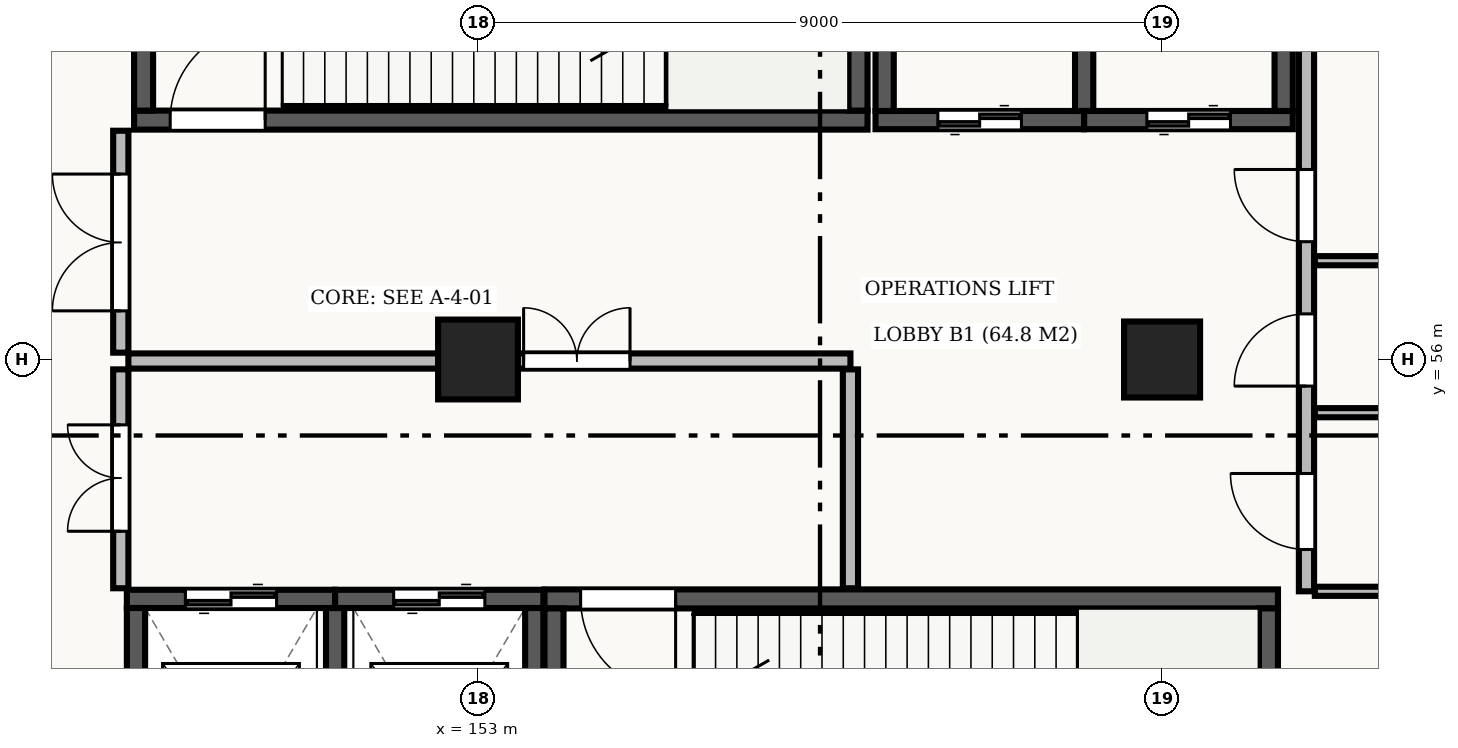
"""IFC4 building model, lengths in metres.
Left out: names, types, materials, properties, quantities, classifications, styles, units other than length and angle.
Written with IfcOpenShell. Run it as: python <this file> out.ifc"""

import sys

from ifc_helpers import new_model, si_unit, direction, frame, frame_2d, origin, origin_2d, place, context, subcontext, project, spatial, rectangle, extrude, element, fill, save


model = new_model("IFC4")
c1 = context("Model", 3, precision=1e-05, world=origin(), true_north=direction((0.0, 1.0)))
c2 = subcontext(c1, "Body", "Model", "MODEL_VIEW")
j1 = project(units=[si_unit("LENGTHUNIT", "METRE"), si_unit("PLANEANGLEUNIT", "RADIAN")], contexts=[c1])
p1 = place(None, origin())
s1 = spatial("IfcSite", under=j1, at=p1, CompositionType="ELEMENT")
p2 = place(p1, origin())
s2 = spatial("IfcBuilding", under=s1, at=p2, CompositionType="ELEMENT")
p3 = place(p2, frame((0.0, 0.0, -6.0)))
s3 = spatial("IfcBuildingStorey", under=s2, at=p3, CompositionType="ELEMENT", Elevation=-6.0)
p4 = place(p3, frame((153.0, 56.0, 0.0), z_axis=(0.0, 0.0, 1.0), x_axis=(1.0, 0.0, 0.0)))
e1 = element("IfcColumn", 1, at=p4, inside=s3, PredefinedType="COLUMN", context=c2, shape_type="SweptSolid", body=[
    extrude(rectangle(XDim=1.05, YDim=1.05, at=origin_2d()), origin(), (0.0, 0.0, 1.0), 6.0),
])
p5 = place(p3, frame((162.0, 56.0, 0.0), z_axis=(0.0, 0.0, 1.0), x_axis=(1.0, 0.0, 0.0)))
e2 = element("IfcColumn", 2, at=p5, inside=s3, PredefinedType="COLUMN", context=c2, shape_type="SweptSolid", body=[
    extrude(rectangle(XDim=1.0, YDim=1.0, at=origin_2d()), origin(), (0.0, 0.0, 1.0), 6.0),
])
p6 = place(p3, frame((148.475, 59.15, 0.0), z_axis=(0.0, 0.0, 1.0), x_axis=(1.0, 0.0, 0.0)))
e3 = element("IfcWall", 3, at=p6, inside=s3, PredefinedType="SHEAR", context=c2, shape_type="SweptSolid", body=[
    extrude(rectangle(XDim=9.65, YDim=0.25, at=frame_2d((4.825, 0.0))), origin(), (0.0, 0.0, 1.0), 5.55),
])
p7 = place(p6, frame((0.475, 0.0, 0.0)))
e4 = element("IfcOpeningElement", 4, at=p7, cuts=e3, PredefinedType="OPENING", context=c2, shape_type="SweptSolid", body=[
    extrude(rectangle(XDim=1.25, YDim=2.15, at=frame_2d((0.625, 1.075))), frame((0.0, 0.137, 0.0), z_axis=(0.0, -1.0, 0.0), x_axis=(1.0, 0.0, 0.0)), (0.0, 0.0, 1.0), 0.274),
])
for number, where, z_axis, x_axis in (
    (5, (148.6, 63.125, 0.0), (0.0, 0.0, 1.0), (0.0, -1.0, 0.0)),
    (6, (158.0, 59.275, 0.0), (0.0, 0.0, 1.0), (0.0, 1.0, 0.0)),
):
    element("IfcWall", number, at=place(p3, frame(where, z_axis=z_axis, x_axis=x_axis)), inside=s3, PredefinedType="SHEAR", context=c2, shape_type="SweptSolid", body=[
        extrude(rectangle(XDim=3.85, YDim=0.25, at=frame_2d((1.925, 0.0))), origin(), (0.0, 0.0, 1.0), 5.55),
    ])
p8 = place(p3, frame((163.525, 52.85, 0.0), z_axis=(0.0, 0.0, 1.0), x_axis=(-1.0, 0.0, 0.0)))
e7 = element("IfcWall", 7, at=p8, inside=s3, PredefinedType="SHEAR", context=c2, shape_type="SweptSolid", body=[
    extrude(rectangle(XDim=9.65, YDim=0.25, at=frame_2d((4.825, 0.0))), origin(), (0.0, 0.0, 1.0), 5.55),
])
p9 = place(p8, frame((7.925, 0.0, 0.0)))
e8 = element("IfcOpeningElement", 8, at=p9, cuts=e7, PredefinedType="OPENING", context=c2, shape_type="SweptSolid", body=[
    extrude(rectangle(XDim=1.25, YDim=2.15, at=frame_2d((0.625, 1.075))), frame((0.0, 0.137, 0.0), z_axis=(0.0, -1.0, 0.0), x_axis=(1.0, 0.0, 0.0)), (0.0, 0.0, 1.0), 0.274),
])
for number, where, z_axis, x_axis in (
    (9, (154.0, 52.725, 0.0), (0.0, 0.0, 1.0), (0.0, -1.0, 0.0)),
    (10, (163.4, 48.875, 0.0), (0.0, 0.0, 1.0), (0.0, 1.0, 0.0)),
):
    element("IfcWall", number, at=place(p3, frame(where, z_axis=z_axis, x_axis=x_axis)), inside=s3, PredefinedType="SHEAR", context=c2, shape_type="SweptSolid", body=[
        extrude(rectangle(XDim=3.85, YDim=0.25, at=frame_2d((1.925, 0.0))), origin(), (0.0, 0.0, 1.0), 5.55),
    ])
p10 = place(p3, frame((158.23, 59.15, 0.0), z_axis=(0.0, 0.0, 1.0), x_axis=(1.0, 0.0, 0.0)))
e11 = element("IfcWall", 11, at=p10, inside=s3, PredefinedType="SHEAR", context=c2, shape_type="SweptSolid", body=[
    extrude(rectangle(XDim=2.745, YDim=0.24, at=frame_2d((1.373, 0.0))), origin(), (0.0, 0.0, 1.0), 5.55),
])
p11 = place(p10, frame((0.82, 0.0, 0.0)))
e12 = element("IfcOpeningElement", 12, at=p11, cuts=e11, PredefinedType="OPENING", context=c2, shape_type="SweptSolid", body=[
    extrude(rectangle(XDim=1.1, YDim=2.2, at=frame_2d((0.55, 1.1))), frame((0.0, 0.132, 0.0), z_axis=(0.0, -1.0, 0.0), x_axis=(1.0, 0.0, 0.0)), (0.0, 0.0, 1.0), 0.264),
])
for number, where, z_axis, x_axis in (
    (13, (158.35, 63.13, 0.0), (0.0, 0.0, 1.0), (0.0, -1.0, 0.0)),
    (14, (160.975, 59.27, 0.0), (0.0, 0.0, 1.0), (0.0, 1.0, 0.0)),
):
    element("IfcWall", number, at=place(p3, frame(where, z_axis=z_axis, x_axis=x_axis)), inside=s3, PredefinedType="SHEAR", context=c2, shape_type="SweptSolid", body=[
        extrude(rectangle(XDim=3.86, YDim=0.24, at=frame_2d((1.93, 0.0))), origin(), (0.0, 0.0, 1.0), 5.55),
    ])
p12 = place(p3, frame((160.975, 59.15, 0.0), z_axis=(0.0, 0.0, 1.0), x_axis=(1.0, 0.0, 0.0)))
e15 = element("IfcWall", 15, at=p12, inside=s3, PredefinedType="SHEAR", context=c2, shape_type="SweptSolid", body=[
    extrude(rectangle(XDim=2.745, YDim=0.24, at=frame_2d((1.373, 0.0))), origin(), (0.0, 0.0, 1.0), 5.55),
])
p13 = place(p12, frame((0.825, 0.0, 0.0)))
e16 = element("IfcOpeningElement", 16, at=p13, cuts=e15, PredefinedType="OPENING", context=c2, shape_type="SweptSolid", body=[
    extrude(rectangle(XDim=1.1, YDim=2.2, at=frame_2d((0.55, 1.1))), frame((0.0, 0.132, 0.0), z_axis=(0.0, -1.0, 0.0), x_axis=(1.0, 0.0, 0.0)), (0.0, 0.0, 1.0), 0.264),
])
p14 = place(p3, frame((163.6, 59.27, 0.0), z_axis=(0.0, 0.0, 1.0), x_axis=(0.0, 1.0, 0.0)))
e17 = element("IfcWall", 17, at=p14, inside=s3, PredefinedType="SHEAR", context=c2, shape_type="SweptSolid", body=[
    extrude(rectangle(XDim=3.86, YDim=0.24, at=frame_2d((1.93, 0.0))), origin(), (0.0, 0.0, 1.0), 5.55),
])
p15 = place(p3, frame((151.12, 52.85, 0.0), z_axis=(0.0, 0.0, 1.0), x_axis=(-1.0, 0.0, 0.0)))
e18 = element("IfcWall", 18, at=p15, inside=s3, PredefinedType="SHEAR", context=c2, shape_type="SweptSolid", body=[
    extrude(rectangle(XDim=2.74, YDim=0.24, at=frame_2d((1.37, 0.0))), origin(), (0.0, 0.0, 1.0), 5.55),
])
p16 = place(p15, frame((0.77, 0.0, 0.0)))
e19 = element("IfcOpeningElement", 19, at=p16, cuts=e18, PredefinedType="OPENING", context=c2, shape_type="SweptSolid", body=[
    extrude(rectangle(XDim=1.2, YDim=2.2, at=frame_2d((0.6, 1.1))), frame((0.0, 0.132, 0.0), z_axis=(0.0, -1.0, 0.0), x_axis=(1.0, 0.0, 0.0)), (0.0, 0.0, 1.0), 0.264),
])
for number, where, z_axis, x_axis in (
    (20, (148.5, 52.73, 0.0), (0.0, 0.0, 1.0), (0.0, -1.0, 0.0)),
    (21, (151.12, 48.87, 0.0), (0.0, 0.0, 1.0), (0.0, 1.0, 0.0)),
):
    element("IfcWall", number, at=place(p3, frame(where, z_axis=z_axis, x_axis=x_axis)), inside=s3, PredefinedType="SHEAR", context=c2, shape_type="SweptSolid", body=[
        extrude(rectangle(XDim=3.86, YDim=0.24, at=frame_2d((1.93, 0.0))), origin(), (0.0, 0.0, 1.0), 5.55),
    ])
p17 = place(p3, frame((153.86, 52.85, 0.0), z_axis=(0.0, 0.0, 1.0), x_axis=(-1.0, 0.0, 0.0)))
e22 = element("IfcWall", 22, at=p17, inside=s3, PredefinedType="SHEAR", context=c2, shape_type="SweptSolid", body=[
    extrude(rectangle(XDim=2.74, YDim=0.24, at=frame_2d((1.37, 0.0))), origin(), (0.0, 0.0, 1.0), 5.55),
])
p18 = place(p17, frame((0.77, 0.0, 0.0)))
e23 = element("IfcOpeningElement", 23, at=p18, cuts=e22, PredefinedType="OPENING", context=c2, shape_type="SweptSolid", body=[
    extrude(rectangle(XDim=1.2, YDim=2.2, at=frame_2d((0.6, 1.1))), frame((0.0, 0.132, 0.0), z_axis=(0.0, -1.0, 0.0), x_axis=(1.0, 0.0, 0.0)), (0.0, 0.0, 1.0), 0.264),
])
p19 = place(p3, frame((153.74, 48.87, 0.0), z_axis=(0.0, 0.0, 1.0), x_axis=(0.0, 1.0, 0.0)))
e24 = element("IfcWall", 24, at=p19, inside=s3, PredefinedType="SHEAR", context=c2, shape_type="SweptSolid", body=[
    extrude(rectangle(XDim=3.86, YDim=0.24, at=frame_2d((1.93, 0.0))), origin(), (0.0, 0.0, 1.0), 5.55),
])
p20 = place(p3, frame((148.4, 55.98, 0.0), z_axis=(0.0, 0.0, 1.0), x_axis=(1.0, 0.0, 0.0)))
e25 = element("IfcWall", 25, at=p20, inside=s3, PredefinedType="STANDARD", context=c2, shape_type="SweptSolid", body=[
    extrude(rectangle(XDim=9.5, YDim=0.2, at=frame_2d((4.75, 0.0))), origin(), (0.0, 0.0, 1.0), 4.48),
])
p21 = place(p20, frame((5.2, 0.0, 0.0)))
e26 = element("IfcOpeningElement", 26, at=p21, cuts=e25, PredefinedType="OPENING", context=c2, shape_type="SweptSolid", body=[
    extrude(rectangle(XDim=1.4, YDim=2.2, at=frame_2d((0.7, 1.1))), frame((0.0, 0.112, 0.0), z_axis=(0.0, -1.0, 0.0), x_axis=(1.0, 0.0, 0.0)), (0.0, 0.0, 1.0), 0.224),
])
p22 = place(p3, frame((157.9, 52.99, 0.0), z_axis=(0.0, 0.0, 1.0), x_axis=(0.0, 1.0, 0.0)))
e27 = element("IfcWall", 27, at=p22, inside=s3, PredefinedType="STANDARD", context=c2, shape_type="SweptSolid", body=[
    extrude(rectangle(XDim=2.88, YDim=0.2, at=frame_2d((1.44, 0.0))), origin(), (0.0, 0.0, 1.0), 5.55),
])
p23 = place(p3, frame((148.3, 52.99, 0.0), z_axis=(0.0, 0.0, 1.0), x_axis=(0.0, 1.0, 0.0)))
e28 = element("IfcWall", 28, at=p23, inside=s3, PredefinedType="STANDARD", context=c2, shape_type="SweptSolid", body=[
    extrude(rectangle(XDim=2.88, YDim=0.2, at=frame_2d((1.44, 0.0))), origin(), (0.0, 0.0, 1.0), 5.55),
])
p24 = place(p23, frame((0.75, 0.0, 0.0)))
e29 = element("IfcOpeningElement", 29, at=p24, cuts=e28, PredefinedType="OPENING", context=c2, shape_type="SweptSolid", body=[
    extrude(rectangle(XDim=1.4, YDim=2.2, at=frame_2d((0.7, 1.1))), frame((0.0, 0.112, 0.0), z_axis=(0.0, -1.0, 0.0), x_axis=(1.0, 0.0, 0.0)), (0.0, 0.0, 1.0), 0.224),
])
p25 = place(p3, frame((148.3, 56.09, 0.0), z_axis=(0.0, 0.0, 1.0), x_axis=(0.0, 1.0, 0.0)))
e30 = element("IfcWall", 30, at=p25, inside=s3, PredefinedType="STANDARD", context=c2, shape_type="SweptSolid", body=[
    extrude(rectangle(XDim=2.92, YDim=0.2, at=frame_2d((1.46, 0.0))), origin(), (0.0, 0.0, 1.0), 5.55),
])
p26 = place(p25, frame((0.55, 0.0, 0.0)))
e31 = element("IfcOpeningElement", 31, at=p26, cuts=e30, PredefinedType="OPENING", context=c2, shape_type="SweptSolid", body=[
    extrude(rectangle(XDim=1.8, YDim=2.2, at=frame_2d((0.9, 1.1))), frame((0.0, 0.112, 0.0), z_axis=(0.0, -1.0, 0.0), x_axis=(1.0, 0.0, 0.0)), (0.0, 0.0, 1.0), 0.224),
])
p27 = place(p3, frame((163.9, 52.95, 0.0), z_axis=(0.0, 0.0, 1.0), x_axis=(0.0, 1.0, 0.0)))
e32 = element("IfcWall", 32, at=p27, inside=s3, PredefinedType="STANDARD", context=c2, shape_type="SweptSolid", body=[
    extrude(rectangle(XDim=10.3, YDim=0.2, at=frame_2d((5.15, 0.0))), origin(), (0.0, 0.0, 1.0), 5.55),
])
p28 = place(p27, frame((0.55, 0.0, 0.0)))
e33 = element("IfcOpeningElement", 33, at=p28, cuts=e32, PredefinedType="OPENING", context=c2, shape_type="SweptSolid", body=[
    extrude(rectangle(XDim=1.0, YDim=2.1, at=frame_2d((0.5, 1.05))), frame((0.0, 0.112, 0.0), z_axis=(0.0, -1.0, 0.0), x_axis=(1.0, 0.0, 0.0)), (0.0, 0.0, 1.0), 0.224),
])
p29 = place(p27, frame((2.7, 0.0, 0.0)))
e34 = element("IfcOpeningElement", 34, at=p29, cuts=e32, PredefinedType="OPENING", context=c2, shape_type="SweptSolid", body=[
    extrude(rectangle(XDim=0.95, YDim=2.1, at=frame_2d((0.475, 1.05))), frame((0.0, 0.112, 0.0), z_axis=(0.0, -1.0, 0.0), x_axis=(1.0, 0.0, 0.0)), (0.0, 0.0, 1.0), 0.224),
])
p30 = place(p27, frame((4.6, 0.0, 0.0)))
e35 = element("IfcOpeningElement", 35, at=p30, cuts=e32, PredefinedType="OPENING", context=c2, shape_type="SweptSolid", body=[
    extrude(rectangle(XDim=0.95, YDim=2.1, at=frame_2d((0.475, 1.05))), frame((0.0, 0.112, 0.0), z_axis=(0.0, -1.0, 0.0), x_axis=(1.0, 0.0, 0.0)), (0.0, 0.0, 1.0), 0.224),
])
for number, where, z_axis, x_axis in (
    (36, (164.01, 52.95, 0.0), (0.0, 0.0, 1.0), (1.0, 0.0, 0.0)),
    (37, (164.01, 55.3, 0.0), (0.0, 0.0, 1.0), (1.0, 0.0, 0.0)),
    (38, (164.01, 57.3, 0.0), (0.0, 0.0, 1.0), (1.0, 0.0, 0.0)),
):
    element("IfcWall", number, at=place(p3, frame(where, z_axis=z_axis, x_axis=x_axis)), inside=s3, PredefinedType="STANDARD", context=c2, shape_type="SweptSolid", body=[
        extrude(rectangle(XDim=6.725, YDim=0.12, at=frame_2d((3.363, 0.0))), origin(), (0.0, 0.0, 1.0), 5.55),
    ])
p31 = place(p7, origin())
e39 = element("IfcDoor", 39, at=p31, inside=s3, OperationType="SINGLE_SWING_RIGHT", PredefinedType="DOOR", context=c2, shape_type="SweptSolid", body=[
    extrude(rectangle(XDim=1.25, YDim=2.15, at=frame_2d((0.625, 1.075))), frame((0.0, 0.025, 0.0), z_axis=(0.0, -1.0, 0.0), x_axis=(1.0, 0.0, 0.0)), (0.0, 0.0, 1.0), 0.05),
])
fill(e4, e39)
p32 = place(p9, origin())
e40 = element("IfcDoor", 40, at=p32, inside=s3, OperationType="SINGLE_SWING_LEFT", PredefinedType="DOOR", context=c2, shape_type="SweptSolid", body=[
    extrude(rectangle(XDim=1.25, YDim=2.15, at=frame_2d((0.625, 1.075))), frame((0.0, 0.025, 0.0), z_axis=(0.0, -1.0, 0.0), x_axis=(1.0, 0.0, 0.0)), (0.0, 0.0, 1.0), 0.05),
])
fill(e8, e40)
p33 = place(p11, origin())
e41 = element("IfcDoor", 41, at=p33, inside=s3, OperationType="DOUBLE_DOOR_SLIDING", PredefinedType="DOOR", context=c2, shape_type="SweptSolid", body=[
    extrude(rectangle(XDim=1.1, YDim=2.2, at=frame_2d((0.55, 1.1))), frame((0.0, 0.025, 0.0), z_axis=(0.0, -1.0, 0.0), x_axis=(1.0, 0.0, 0.0)), (0.0, 0.0, 1.0), 0.05),
])
fill(e12, e41)
p34 = place(p13, origin())
e42 = element("IfcDoor", 42, at=p34, inside=s3, OperationType="DOUBLE_DOOR_SLIDING", PredefinedType="DOOR", context=c2, shape_type="SweptSolid", body=[
    extrude(rectangle(XDim=1.1, YDim=2.2, at=frame_2d((0.55, 1.1))), frame((0.0, 0.025, 0.0), z_axis=(0.0, -1.0, 0.0), x_axis=(1.0, 0.0, 0.0)), (0.0, 0.0, 1.0), 0.05),
])
fill(e16, e42)
p35 = place(p16, origin())
e43 = element("IfcDoor", 43, at=p35, inside=s3, OperationType="DOUBLE_DOOR_SLIDING", PredefinedType="DOOR", context=c2, shape_type="SweptSolid", body=[
    extrude(rectangle(XDim=1.2, YDim=2.2, at=frame_2d((0.6, 1.1))), frame((0.0, 0.025, 0.0), z_axis=(0.0, -1.0, 0.0), x_axis=(1.0, 0.0, 0.0)), (0.0, 0.0, 1.0), 0.05),
])
fill(e19, e43)
p36 = place(p18, origin())
e44 = element("IfcDoor", 44, at=p36, inside=s3, OperationType="DOUBLE_DOOR_SLIDING", PredefinedType="DOOR", context=c2, shape_type="SweptSolid", body=[
    extrude(rectangle(XDim=1.2, YDim=2.2, at=frame_2d((0.6, 1.1))), frame((0.0, 0.025, 0.0), z_axis=(0.0, -1.0, 0.0), x_axis=(1.0, 0.0, 0.0)), (0.0, 0.0, 1.0), 0.05),
])
fill(e23, e44)
p37 = place(p21, origin())
e45 = element("IfcDoor", 45, at=p37, inside=s3, OperationType="DOUBLE_DOOR_SINGLE_SWING", PredefinedType="DOOR", context=c2, shape_type="SweptSolid", body=[
    extrude(rectangle(XDim=1.4, YDim=2.2, at=frame_2d((0.7, 1.1))), frame((0.0, 0.025, 0.0), z_axis=(0.0, -1.0, 0.0), x_axis=(1.0, 0.0, 0.0)), (0.0, 0.0, 1.0), 0.05),
])
fill(e26, e45)
p38 = place(p24, origin())
e46 = element("IfcDoor", 46, at=p38, inside=s3, OperationType="DOUBLE_DOOR_SINGLE_SWING", PredefinedType="DOOR", context=c2, shape_type="SweptSolid", body=[
    extrude(rectangle(XDim=1.4, YDim=2.2, at=frame_2d((0.7, 1.1))), frame((0.0, 0.025, 0.0), z_axis=(0.0, -1.0, 0.0), x_axis=(1.0, 0.0, 0.0)), (0.0, 0.0, 1.0), 0.05),
])
fill(e29, e46)
p39 = place(p26, origin())
e47 = element("IfcDoor", 47, at=p39, inside=s3, OperationType="DOUBLE_DOOR_SINGLE_SWING", PredefinedType="DOOR", context=c2, shape_type="SweptSolid", body=[
    extrude(rectangle(XDim=1.8, YDim=2.2, at=frame_2d((0.9, 1.1))), frame((0.0, 0.025, 0.0), z_axis=(0.0, -1.0, 0.0), x_axis=(1.0, 0.0, 0.0)), (0.0, 0.0, 1.0), 0.05),
])
fill(e31, e47)
p40 = place(p28, origin())
e48 = element("IfcDoor", 48, at=p40, inside=s3, OperationType="SINGLE_SWING_RIGHT", PredefinedType="DOOR", context=c2, shape_type="SweptSolid", body=[
    extrude(rectangle(XDim=1.0, YDim=2.1, at=frame_2d((0.5, 1.05))), frame((0.0, 0.025, 0.0), z_axis=(0.0, -1.0, 0.0), x_axis=(1.0, 0.0, 0.0)), (0.0, 0.0, 1.0), 0.05),
])
fill(e33, e48)
p41 = place(p29, origin())
e49 = element("IfcDoor", 49, at=p41, inside=s3, OperationType="SINGLE_SWING_LEFT", PredefinedType="DOOR", context=c2, shape_type="SweptSolid", body=[
    extrude(rectangle(XDim=0.95, YDim=2.1, at=frame_2d((0.475, 1.05))), frame((0.0, 0.025, 0.0), z_axis=(0.0, -1.0, 0.0), x_axis=(1.0, 0.0, 0.0)), (0.0, 0.0, 1.0), 0.05),
])
fill(e34, e49)
p42 = place(p30, origin())
e50 = element("IfcDoor", 50, at=p42, inside=s3, OperationType="SINGLE_SWING_RIGHT", PredefinedType="DOOR", context=c2, shape_type="SweptSolid", body=[
    extrude(rectangle(XDim=0.95, YDim=2.1, at=frame_2d((0.475, 1.05))), frame((0.0, 0.025, 0.0), z_axis=(0.0, -1.0, 0.0), x_axis=(1.0, 0.0, 0.0)), (0.0, 0.0, 1.0), 0.05),
])
fill(e35, e50)
save(model, sys.argv[1])
